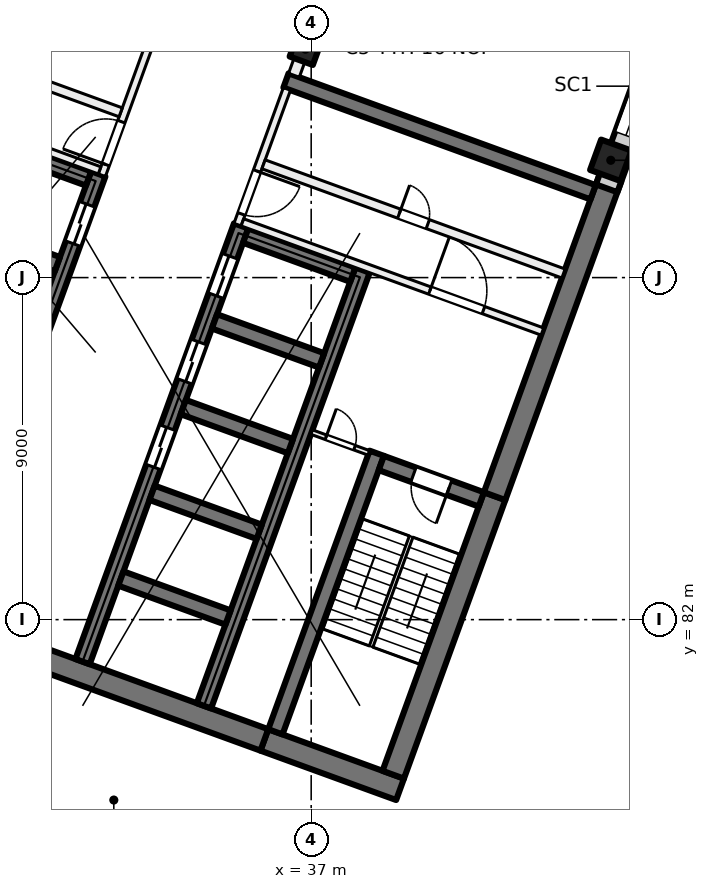
"""IFC4 building model, lengths in metres.
Left out: names, types, materials, properties, quantities, classifications, styles, units other than length and angle.
Written with IfcOpenShell. Run it as: python <this file> out.ifc"""

import sys

from ifc_helpers import new_model, si_unit, direction, frame, frame_2d, origin, origin_2d, place, context, subcontext, project, spatial, rectangle, extrude, element, fill, save


model = new_model("IFC4")
c1 = context("Model", 3, precision=1e-05, world=origin(), true_north=direction((0.0, 1.0)))
c2 = subcontext(c1, "Body", "Model", "MODEL_VIEW")
j1 = project(units=[si_unit("LENGTHUNIT", "METRE"), si_unit("PLANEANGLEUNIT", "RADIAN")], contexts=[c1])
p1 = place(None, origin())
s1 = spatial("IfcSite", under=j1, at=p1, CompositionType="ELEMENT")
p2 = place(p1, origin())
s2 = spatial("IfcBuilding", under=s1, at=p2, CompositionType="ELEMENT")
p3 = place(p2, frame((0.0, 0.0, 93.0)))
s3 = spatial("IfcBuildingStorey", under=s2, at=p3, CompositionType="ELEMENT", Elevation=93.0)
p4 = place(p3, frame((36.849, 97.011, 0.0), z_axis=(0.0, 0.0, 1.0), x_axis=(-0.342020143326, -0.939692620786, 0.0)))
e1 = element("IfcColumn", 1, at=p4, inside=s3, PredefinedType="COLUMN", context=c2, shape_type="SweptSolid", body=[
    extrude(rectangle(XDim=0.65, YDim=0.65, at=origin_2d()), origin(), (0.0, 0.0, 1.0), 4.0),
])
p5 = place(p3, frame((44.884, 94.087, 0.0), z_axis=(0.0, 0.0, 1.0), x_axis=(-0.342020143326, -0.939692620786, 0.0)))
e2 = element("IfcColumn", 2, at=p5, inside=s3, PredefinedType="COLUMN", context=c2, shape_type="SweptSolid", body=[
    extrude(rectangle(XDim=0.85, YDim=0.85, at=origin_2d()), origin(), (0.0, 0.0, 1.0), 4.0),
])
p6 = place(p3, frame((39.338, 77.535, 0.0), z_axis=(0.0, 0.0, 1.0), x_axis=(-0.939701471648, 0.341995824804, 0.0)))
e3 = element("IfcWall", 3, at=p6, inside=s3, PredefinedType="SHEAR", context=c2, shape_type="SweptSolid", body=[
    extrude(rectangle(XDim=3.8, YDim=0.6, at=frame_2d((1.9, 0.0))), origin(), (0.0, 0.0, 1.0), 4.0),
])
p7 = place(p3, frame((35.767, 78.835, 0.0), z_axis=(0.0, 0.0, 1.0), x_axis=(-0.939692894512, 0.342019391267, 0.0)))
e4 = element("IfcWall", 4, at=p7, inside=s3, PredefinedType="SHEAR", context=c2, shape_type="SweptSolid", body=[
    extrude(rectangle(XDim=14.4, YDim=0.6, at=frame_2d((7.2, 0.0))), origin(), (0.0, 0.0, 1.0), 4.0),
])
p8 = place(p3, frame((39.159, 77.92, 0.0), z_axis=(0.0, 0.0, 1.0), x_axis=(0.342016982193, 0.939693771338, 0.0)))
e5 = element("IfcWall", 5, at=p8, inside=s3, PredefinedType="SHEAR", context=c2, shape_type="SweptSolid", body=[
    extrude(rectangle(XDim=7.8, YDim=0.6, at=frame_2d((3.9, 0.0))), origin(), (0.0, 0.0, 1.0), 4.0),
])
p9 = place(p3, frame((41.827, 85.249, 0.0), z_axis=(0.0, 0.0, 1.0), x_axis=(0.342017595281, 0.939693548195, 0.0)))
e6 = element("IfcWall", 6, at=p9, inside=s3, PredefinedType="SHEAR", context=c2, shape_type="SweptSolid", body=[
    extrude(rectangle(XDim=8.925, YDim=0.6, at=frame_2d((4.462, 0.0))), origin(), (0.0, 0.0, 1.0), 4.0),
])
p10 = place(p3, frame((36.058, 79.048, 0.0), z_axis=(0.0, 0.0, 1.0), x_axis=(0.342016982193, 0.939693771338, 0.0)))
e7 = element("IfcWall", 7, at=p10, inside=s3, PredefinedType="SHEAR", context=c2, shape_type="SweptSolid", body=[
    extrude(rectangle(XDim=7.8, YDim=0.4, at=frame_2d((3.9, 0.0))), origin(), (0.0, 0.0, 1.0), 4.0),
])
p11 = place(p3, frame((41.476, 85.164, 0.0), z_axis=(0.0, 0.0, 1.0), x_axis=(-0.939678810556, 0.342058084236, 0.0)))
e8 = element("IfcWall", 8, at=p11, inside=s3, PredefinedType="SHEAR", context=c2, shape_type="SweptSolid", body=[
    extrude(rectangle(XDim=2.8, YDim=0.4, at=frame_2d((1.4, 0.0))), origin(), (0.0, 0.0, 1.0), 4.0),
])
p12 = place(p11, frame((0.9, 0.0, 0.0)))
e9 = element("IfcOpeningElement", 9, at=p12, cuts=e8, PredefinedType="OPENING", context=c2, shape_type="SweptSolid", body=[
    extrude(rectangle(XDim=1.0, YDim=2.1, at=frame_2d((0.5, 1.05))), frame((0.0, 0.21, 0.0), z_axis=(0.0, -1.0, 0.0), x_axis=(1.0, 0.0, 0.0)), (0.0, 0.0, 1.0), 0.42),
])
p13 = place(p3, frame((30.984, 80.895, 0.0), z_axis=(0.0, 0.0, 1.0), x_axis=(0.342021021735, 0.939692301071, 0.0)))
e10 = element("IfcWall", 10, at=p13, inside=s3, PredefinedType="SHEAR", context=c2, shape_type="SweptSolid", body=[
    extrude(rectangle(XDim=12.2, YDim=0.4, at=frame_2d((6.1, 0.0))), origin(), (0.0, 0.0, 1.0), 4.0),
])
p14 = place(p13, frame((5.45, 0.0, 0.0)))
e11 = element("IfcOpeningElement", 11, at=p14, cuts=e10, PredefinedType="OPENING", context=c2, shape_type="SweptSolid", body=[
    extrude(rectangle(XDim=1.1, YDim=2.1, at=frame_2d((0.55, 1.05))), frame((0.0, 0.21, 0.0), z_axis=(0.0, -1.0, 0.0), x_axis=(1.0, 0.0, 0.0)), (0.0, 0.0, 1.0), 0.42),
])
p15 = place(p13, frame((7.85, 0.0, 0.0)))
e12 = element("IfcOpeningElement", 12, at=p15, cuts=e10, PredefinedType="OPENING", context=c2, shape_type="SweptSolid", body=[
    extrude(rectangle(XDim=1.1, YDim=2.1, at=frame_2d((0.55, 1.05))), frame((0.0, 0.21, 0.0), z_axis=(0.0, -1.0, 0.0), x_axis=(1.0, 0.0, 0.0)), (0.0, 0.0, 1.0), 0.42),
])
p16 = place(p13, frame((10.25, 0.0, 0.0)))
e13 = element("IfcOpeningElement", 13, at=p16, cuts=e10, PredefinedType="OPENING", context=c2, shape_type="SweptSolid", body=[
    extrude(rectangle(XDim=1.1, YDim=2.1, at=frame_2d((0.55, 1.05))), frame((0.0, 0.21, 0.0), z_axis=(0.0, -1.0, 0.0), x_axis=(1.0, 0.0, 0.0)), (0.0, 0.0, 1.0), 0.42),
])
p17 = place(p3, frame((34.178, 79.732, 0.0), z_axis=(0.0, 0.0, 1.0), x_axis=(0.342014590177, 0.939694641948, 0.0)))
e14 = element("IfcWall", 14, at=p17, inside=s3, PredefinedType="SHEAR", context=c2, shape_type="SweptSolid", body=[
    extrude(rectangle(XDim=12.2, YDim=0.4, at=frame_2d((6.1, 0.0))), origin(), (0.0, 0.0, 1.0), 4.0),
])
for number, where, z_axis, x_axis in (
    (15, (34.812, 82.056, 0.0), (0.0, 0.0, 1.0), (-0.94, 0.342, 0.0)),
    (16, (35.632, 84.311, 0.0), (0.0, 0.0, 1.0), (-0.94, 0.342, 0.0)),
    (17, (36.453, 86.566, 0.0), (0.0, 0.0, 1.0), (-0.94, 0.342, 0.0)),
    (18, (37.274, 88.822, 0.0), (0.0, 0.0, 1.0), (-0.94, 0.342, 0.0)),
):
    element("IfcWall", number, at=place(p3, frame(where, z_axis=z_axis, x_axis=x_axis)), inside=s3, PredefinedType="SHEAR", context=c2, shape_type="SweptSolid", body=[
        extrude(rectangle(XDim=3.0, YDim=0.4, at=frame_2d((1.5, 0.0))), origin(), (0.0, 0.0, 1.0), 4.0),
    ])
p18 = place(p3, frame((38.095, 91.077, 0.0), z_axis=(0.0, 0.0, 1.0), x_axis=(-0.939676934218, 0.342063238742, 0.0)))
e19 = element("IfcWall", 19, at=p18, inside=s3, PredefinedType="SHEAR", context=c2, shape_type="SweptSolid", body=[
    extrude(rectangle(XDim=3.0, YDim=0.4, at=frame_2d((1.5, 0.0))), origin(), (0.0, 0.0, 1.0), 4.0),
])
p19 = place(p3, frame((27.225, 82.263, 0.0), z_axis=(0.0, 0.0, 1.0), x_axis=(0.342014590177, 0.939694641948, 0.0)))
e20 = element("IfcWall", 20, at=p19, inside=s3, PredefinedType="SHEAR", context=c2, shape_type="SweptSolid", body=[
    extrude(rectangle(XDim=12.2, YDim=0.4, at=frame_2d((6.1, 0.0))), origin(), (0.0, 0.0, 1.0), 4.0),
])
p20 = place(p19, frame((10.25, 0.0, 0.0)))
e21 = element("IfcOpeningElement", 21, at=p20, cuts=e20, PredefinedType="OPENING", context=c2, shape_type="SweptSolid", body=[
    extrude(rectangle(XDim=1.1, YDim=2.1, at=frame_2d((0.55, 1.05))), frame((0.0, 0.21, 0.0), z_axis=(0.0, -1.0, 0.0), x_axis=(1.0, 0.0, 0.0)), (0.0, 0.0, 1.0), 0.42),
])
p21 = place(p19, frame((0.7, 0.0, 0.0)))
e22 = element("IfcOpeningElement", 22, at=p21, cuts=e20, PredefinedType="OPENING", context=c2, shape_type="SweptSolid", body=[
    extrude(rectangle(XDim=0.8, YDim=2.1, at=frame_2d((0.4, 1.05))), frame((0.0, 0.21, 0.0), z_axis=(0.0, -1.0, 0.0), x_axis=(1.0, 0.0, 0.0)), (0.0, 0.0, 1.0), 0.42),
])
for number, where, z_axis, x_axis in (
    (23, (30.32, 91.353, 0.0), (0.0, 0.0, 1.0), (-0.94, 0.342, 0.0)),
    (24, (31.141, 93.608, 0.0), (0.0, 0.0, 1.0), (-0.94, 0.342, 0.0)),
):
    element("IfcWall", number, at=place(p3, frame(where, z_axis=z_axis, x_axis=x_axis)), inside=s3, PredefinedType="SHEAR", context=c2, shape_type="SweptSolid", body=[
        extrude(rectangle(XDim=3.0, YDim=0.4, at=frame_2d((1.5, 0.0))), origin(), (0.0, 0.0, 1.0), 4.0),
    ])
p22 = place(p3, frame((44.418, 93.245, 0.0), z_axis=(0.0, 0.0, 1.0), x_axis=(-0.93969060187, 0.342025690201, 0.0)))
e25 = element("IfcWall", 25, at=p22, inside=s3, PredefinedType="SHEAR", context=c2, shape_type="SweptSolid", body=[
    extrude(rectangle(XDim=8.6, YDim=0.4, at=frame_2d((4.3, 0.0))), origin(), (0.0, 0.0, 1.0), 4.0),
])
p23 = place(p3, frame((52.212, 113.783, 0.0), z_axis=(0.0, 0.0, 1.0), x_axis=(-0.34202521188, -0.939690775968, 0.0)))
e26 = element("IfcWall", 26, at=p23, inside=s3, PredefinedType="SOLIDWALL", context=c2, shape_type="SweptSolid", body=[
    extrude(rectangle(XDim=21.745, YDim=0.6, at=frame_2d((10.873, 0.0))), origin(), (0.0, 0.0, 1.0), 3.625),
])
p24 = place(p23, frame((3.765, 0.0, 0.9)))
e27 = element("IfcOpeningElement", 27, at=p24, cuts=e26, PredefinedType="OPENING", context=c2, shape_type="SweptSolid", body=[
    extrude(rectangle(XDim=3.0, YDim=2.4, at=frame_2d((1.5, 1.2))), frame((0.0, 0.31, 0.0), z_axis=(0.0, -1.0, 0.0), x_axis=(1.0, 0.0, 0.0)), (0.0, 0.0, 1.0), 0.62),
])
p25 = place(p23, frame((8.265, 0.0, 0.9)))
e28 = element("IfcOpeningElement", 28, at=p25, cuts=e26, PredefinedType="OPENING", context=c2, shape_type="SweptSolid", body=[
    extrude(rectangle(XDim=3.0, YDim=2.4, at=frame_2d((1.5, 1.2))), frame((0.0, 0.31, 0.0), z_axis=(0.0, -1.0, 0.0), x_axis=(1.0, 0.0, 0.0)), (0.0, 0.0, 1.0), 0.62),
])
p26 = place(p23, frame((12.765, 0.0, 0.9)))
e29 = element("IfcOpeningElement", 29, at=p26, cuts=e26, PredefinedType="OPENING", context=c2, shape_type="SweptSolid", body=[
    extrude(rectangle(XDim=3.0, YDim=2.4, at=frame_2d((1.5, 1.2))), frame((0.0, 0.31, 0.0), z_axis=(0.0, -1.0, 0.0), x_axis=(1.0, 0.0, 0.0)), (0.0, 0.0, 1.0), 0.62),
])
p27 = place(p23, frame((17.265, 0.0, 0.9)))
e30 = element("IfcOpeningElement", 30, at=p27, cuts=e26, PredefinedType="OPENING", context=c2, shape_type="SweptSolid", body=[
    extrude(rectangle(XDim=3.0, YDim=2.4, at=frame_2d((1.5, 1.2))), frame((0.0, 0.31, 0.0), z_axis=(0.0, -1.0, 0.0), x_axis=(1.0, 0.0, 0.0)), (0.0, 0.0, 1.0), 0.62),
])
p28 = place(p3, frame((31.491, 93.693, 0.0), z_axis=(0.0, 0.0, 1.0), x_axis=(0.341995824804, 0.939701471648, 0.0)))
e31 = element("IfcWall", 31, at=p28, inside=s3, PredefinedType="PARTITIONING", context=c2, shape_type="SweptSolid", body=[
    extrude(rectangle(XDim=3.8, YDim=0.2, at=frame_2d((1.9, 0.0))), origin(), (0.0, 0.0, 1.0), 3.625),
])
p29 = place(p28, frame((0.3, 0.0, 0.0)))
e32 = element("IfcOpeningElement", 32, at=p29, cuts=e31, PredefinedType="OPENING", context=c2, shape_type="SweptSolid", body=[
    extrude(rectangle(XDim=1.2, YDim=2.1, at=frame_2d((0.6, 1.05))), frame((0.0, 0.11, 0.0), z_axis=(0.0, -1.0, 0.0), x_axis=(1.0, 0.0, 0.0)), (0.0, 0.0, 1.0), 0.22),
])
p30 = place(p3, frame((23.538, 96.694, 0.0), z_axis=(0.0, 0.0, 1.0), x_axis=(0.939691552312, -0.342023078919, 0.0)))
e33 = element("IfcWall", 33, at=p30, inside=s3, PredefinedType="PARTITIONING", context=c2, shape_type="SweptSolid", body=[
    extrude(rectangle(XDim=8.4, YDim=0.2, at=frame_2d((4.2, 0.0))), origin(), (0.0, 0.0, 1.0), 3.625),
])
p31 = place(p30, frame((1.65, 0.0, 0.0)))
e34 = element("IfcOpeningElement", 34, at=p31, cuts=e33, PredefinedType="OPENING", context=c2, shape_type="SweptSolid", body=[
    extrude(rectangle(XDim=1.5, YDim=2.1, at=frame_2d((0.75, 1.05))), frame((0.0, 0.11, 0.0), z_axis=(0.0, -1.0, 0.0), x_axis=(1.0, 0.0, 0.0)), (0.0, 0.0, 1.0), 0.22),
])
p32 = place(p3, frame((24.094, 98.221, 0.0), z_axis=(0.0, 0.0, 1.0), x_axis=(0.939691552312, -0.342023078919, 0.0)))
e35 = element("IfcWall", 35, at=p32, inside=s3, PredefinedType="PARTITIONING", context=c2, shape_type="SweptSolid", body=[
    extrude(rectangle(XDim=8.4, YDim=0.25, at=frame_2d((4.2, 0.0))), origin(), (0.0, 0.0, 1.0), 3.625),
])
p33 = place(p32, frame((3.8, 0.0, 0.0)))
e36 = element("IfcOpeningElement", 36, at=p33, cuts=e35, PredefinedType="OPENING", context=c2, shape_type="SweptSolid", body=[
    extrude(rectangle(XDim=0.8, YDim=2.1, at=frame_2d((0.4, 1.05))), frame((0.0, 0.135, 0.0), z_axis=(0.0, -1.0, 0.0), x_axis=(1.0, 0.0, 0.0)), (0.0, 0.0, 1.0), 0.27),
])
p34 = place(p3, frame((36.362, 95.964, 0.0), z_axis=(0.0, 0.0, 1.0), x_axis=(-0.341995824804, -0.939701471648, 0.0)))
e37 = element("IfcWall", 37, at=p34, inside=s3, PredefinedType="PARTITIONING", context=c2, shape_type="SweptSolid", body=[
    extrude(rectangle(XDim=3.8, YDim=0.2, at=frame_2d((1.9, 0.0))), origin(), (0.0, 0.0, 1.0), 3.625),
])
p35 = place(p34, frame((2.3, 0.0, 0.0)))
e38 = element("IfcOpeningElement", 38, at=p35, cuts=e37, PredefinedType="OPENING", context=c2, shape_type="SweptSolid", body=[
    extrude(rectangle(XDim=1.2, YDim=2.1, at=frame_2d((0.6, 1.05))), frame((0.0, 0.11, 0.0), z_axis=(0.0, -1.0, 0.0), x_axis=(1.0, 0.0, 0.0)), (0.0, 0.0, 1.0), 0.22),
])
p36 = place(p3, frame((35.19, 92.453, 0.0), z_axis=(0.0, 0.0, 1.0), x_axis=(0.939691552312, -0.342023078919, 0.0)))
e39 = element("IfcWall", 39, at=p36, inside=s3, PredefinedType="PARTITIONING", context=c2, shape_type="SweptSolid", body=[
    extrude(rectangle(XDim=8.4, YDim=0.2, at=frame_2d((4.2, 0.0))), origin(), (0.0, 0.0, 1.0), 3.625),
])
p37 = place(p36, frame((5.25, 0.0, 0.0)))
e40 = element("IfcOpeningElement", 40, at=p37, cuts=e39, PredefinedType="OPENING", context=c2, shape_type="SweptSolid", body=[
    extrude(rectangle(XDim=1.5, YDim=2.1, at=frame_2d((0.75, 1.05))), frame((0.0, 0.11, 0.0), z_axis=(0.0, -1.0, 0.0), x_axis=(1.0, 0.0, 0.0)), (0.0, 0.0, 1.0), 0.22),
])
p38 = place(p3, frame((35.746, 93.98, 0.0), z_axis=(0.0, 0.0, 1.0), x_axis=(0.939691552312, -0.342023078919, 0.0)))
e41 = element("IfcWall", 41, at=p38, inside=s3, PredefinedType="PARTITIONING", context=c2, shape_type="SweptSolid", body=[
    extrude(rectangle(XDim=8.4, YDim=0.25, at=frame_2d((4.2, 0.0))), origin(), (0.0, 0.0, 1.0), 3.625),
])
p39 = place(p38, frame((3.8, 0.0, 0.0)))
e42 = element("IfcOpeningElement", 42, at=p39, cuts=e41, PredefinedType="OPENING", context=c2, shape_type="SweptSolid", body=[
    extrude(rectangle(XDim=0.8, YDim=2.1, at=frame_2d((0.4, 1.05))), frame((0.0, 0.135, 0.0), z_axis=(0.0, -1.0, 0.0), x_axis=(1.0, 0.0, 0.0)), (0.0, 0.0, 1.0), 0.27),
])
p40 = place(p3, frame((37.013, 86.935, 0.0), z_axis=(0.0, 0.0, 1.0), x_axis=(0.939659694648, -0.342110593602, 0.0)))
e43 = element("IfcWall", 43, at=p40, inside=s3, PredefinedType="PARTITIONING", context=c2, shape_type="SweptSolid", body=[
    extrude(rectangle(XDim=1.6, YDim=0.125, at=frame_2d((0.8, 0.0))), origin(), (0.0, 0.0, 1.0), 3.625),
])
p41 = place(p40, frame((0.4, 0.0, 0.0)))
e44 = element("IfcOpeningElement", 44, at=p41, cuts=e43, PredefinedType="OPENING", context=c2, shape_type="SweptSolid", body=[
    extrude(rectangle(XDim=0.8, YDim=2.1, at=frame_2d((0.4, 1.05))), frame((0.0, 0.073, 0.0), z_axis=(0.0, -1.0, 0.0), x_axis=(1.0, 0.0, 0.0)), (0.0, 0.0, 1.0), 0.145),
])
p42 = place(p3, frame((47.314, 125.909, 0.0), z_axis=(0.0, 0.0, 1.0), x_axis=(-0.342010770371, -0.939696032209, 0.0)))
e45 = element("IfcWall", 45, at=p42, inside=s3, PredefinedType="PARTITIONING", context=c2, shape_type="SweptSolid", body=[
    extrude(rectangle(XDim=31.485, YDim=0.3, at=frame_2d((15.742, 0.0))), origin(), (0.0, 0.0, 1.0), 3.625),
])
p43 = place(p42, frame((26.11, 0.0, 0.0)))
e46 = element("IfcOpeningElement", 46, at=p43, cuts=e45, PredefinedType="OPENING", context=c2, shape_type="SweptSolid", body=[
    extrude(rectangle(XDim=1.0, YDim=2.1, at=frame_2d((0.5, 1.05))), frame((0.0, 0.16, 0.0), z_axis=(0.0, -1.0, 0.0), x_axis=(1.0, 0.0, 0.0)), (0.0, 0.0, 1.0), 0.32),
])
p44 = place(p42, frame((15.485, 0.0, 0.0)))
e47 = element("IfcOpeningElement", 47, at=p44, cuts=e45, PredefinedType="OPENING", context=c2, shape_type="SweptSolid", body=[
    extrude(rectangle(XDim=1.0, YDim=2.1, at=frame_2d((0.5, 1.05))), frame((0.0, 0.16, 0.0), z_axis=(0.0, -1.0, 0.0), x_axis=(1.0, 0.0, 0.0)), (0.0, 0.0, 1.0), 0.32),
])
p45 = place(p42, frame((9.985, 0.0, 0.0)))
e48 = element("IfcOpeningElement", 48, at=p45, cuts=e45, PredefinedType="OPENING", context=c2, shape_type="SweptSolid", body=[
    extrude(rectangle(XDim=1.0, YDim=2.1, at=frame_2d((0.5, 1.05))), frame((0.0, 0.16, 0.0), z_axis=(0.0, -1.0, 0.0), x_axis=(1.0, 0.0, 0.0)), (0.0, 0.0, 1.0), 0.32),
])
p46 = place(p42, frame((5.484, 0.0, 0.0)))
e49 = element("IfcOpeningElement", 49, at=p46, cuts=e45, PredefinedType="OPENING", context=c2, shape_type="SweptSolid", body=[
    extrude(rectangle(XDim=1.0, YDim=2.1, at=frame_2d((0.5, 1.05))), frame((0.0, 0.16, 0.0), z_axis=(0.0, -1.0, 0.0), x_axis=(1.0, 0.0, 0.0)), (0.0, 0.0, 1.0), 0.32),
])
p47 = place(p27, origin())
e50 = element("IfcWindow", 50, at=p47, inside=s3, PartitioningType="SINGLE_PANEL", PredefinedType="WINDOW", context=c2, shape_type="SweptSolid", body=[
    extrude(rectangle(XDim=3.0, YDim=2.4, at=frame_2d((1.5, 1.2))), frame((0.0, 0.03, 0.0), z_axis=(0.0, -1.0, 0.0), x_axis=(1.0, 0.0, 0.0)), (0.0, 0.0, 1.0), 0.06),
])
fill(e30, e50)
p48 = place(p20, origin())
e51 = element("IfcDoor", 51, at=p48, inside=s3, OperationType="DOUBLE_DOOR_SLIDING", PredefinedType="DOOR", context=c2, shape_type="SweptSolid", body=[
    extrude(rectangle(XDim=1.1, YDim=2.1, at=frame_2d((0.55, 1.05))), frame((0.0, 0.025, 0.0), z_axis=(0.0, -1.0, 0.0), x_axis=(1.0, 0.0, 0.0)), (0.0, 0.0, 1.0), 0.05),
])
fill(e21, e51)
p49 = place(p14, origin())
e52 = element("IfcDoor", 52, at=p49, inside=s3, OperationType="DOUBLE_DOOR_SLIDING", PredefinedType="DOOR", context=c2, shape_type="SweptSolid", body=[
    extrude(rectangle(XDim=1.1, YDim=2.1, at=frame_2d((0.55, 1.05))), frame((0.0, 0.025, 0.0), z_axis=(0.0, -1.0, 0.0), x_axis=(1.0, 0.0, 0.0)), (0.0, 0.0, 1.0), 0.05),
])
fill(e11, e52)
p50 = place(p15, origin())
e53 = element("IfcDoor", 53, at=p50, inside=s3, OperationType="DOUBLE_DOOR_SLIDING", PredefinedType="DOOR", context=c2, shape_type="SweptSolid", body=[
    extrude(rectangle(XDim=1.1, YDim=2.1, at=frame_2d((0.55, 1.05))), frame((0.0, 0.025, 0.0), z_axis=(0.0, -1.0, 0.0), x_axis=(1.0, 0.0, 0.0)), (0.0, 0.0, 1.0), 0.05),
])
fill(e12, e53)
p51 = place(p16, origin())
e54 = element("IfcDoor", 54, at=p51, inside=s3, OperationType="DOUBLE_DOOR_SLIDING", PredefinedType="DOOR", context=c2, shape_type="SweptSolid", body=[
    extrude(rectangle(XDim=1.1, YDim=2.1, at=frame_2d((0.55, 1.05))), frame((0.0, 0.025, 0.0), z_axis=(0.0, -1.0, 0.0), x_axis=(1.0, 0.0, 0.0)), (0.0, 0.0, 1.0), 0.05),
])
fill(e13, e54)
p52 = place(p29, origin())
e55 = element("IfcDoor", 55, at=p52, inside=s3, OperationType="DOUBLE_DOOR_SINGLE_SWING", PredefinedType="DOOR", context=c2, shape_type="SweptSolid", body=[
    extrude(rectangle(XDim=1.2, YDim=2.1, at=frame_2d((0.6, 1.05))), frame((0.0, 0.025, 0.0), z_axis=(0.0, -1.0, 0.0), x_axis=(1.0, 0.0, 0.0)), (0.0, 0.0, 1.0), 0.05),
])
fill(e32, e55)
p53 = place(p35, origin())
e56 = element("IfcDoor", 56, at=p53, inside=s3, OperationType="DOUBLE_DOOR_SINGLE_SWING", PredefinedType="DOOR", context=c2, shape_type="SweptSolid", body=[
    extrude(rectangle(XDim=1.2, YDim=2.1, at=frame_2d((0.6, 1.05))), frame((0.0, 0.025, 0.0), z_axis=(0.0, -1.0, 0.0), x_axis=(1.0, 0.0, 0.0)), (0.0, 0.0, 1.0), 0.05),
])
fill(e38, e56)
p54 = place(p37, origin())
e57 = element("IfcDoor", 57, at=p54, inside=s3, OperationType="DOUBLE_DOOR_SINGLE_SWING", PredefinedType="DOOR", context=c2, shape_type="SweptSolid", body=[
    extrude(rectangle(XDim=1.5, YDim=2.1, at=frame_2d((0.75, 1.05))), frame((0.0, 0.025, 0.0), z_axis=(0.0, -1.0, 0.0), x_axis=(1.0, 0.0, 0.0)), (0.0, 0.0, 1.0), 0.05),
])
fill(e40, e57)
p55 = place(p12, origin())
e58 = element("IfcDoor", 58, at=p55, inside=s3, OperationType="SINGLE_SWING_RIGHT", PredefinedType="DOOR", context=c2, shape_type="SweptSolid", body=[
    extrude(rectangle(XDim=1.0, YDim=2.1, at=frame_2d((0.5, 1.05))), frame((0.0, 0.025, 0.0), z_axis=(0.0, -1.0, 0.0), x_axis=(1.0, 0.0, 0.0)), (0.0, 0.0, 1.0), 0.05),
])
fill(e9, e58)
p56 = place(p41, origin())
e59 = element("IfcDoor", 59, at=p56, inside=s3, OperationType="SINGLE_SWING_LEFT", PredefinedType="DOOR", context=c2, shape_type="SweptSolid", body=[
    extrude(rectangle(XDim=0.8, YDim=2.1, at=frame_2d((0.4, 1.05))), frame((0.0, 0.025, 0.0), z_axis=(0.0, -1.0, 0.0), x_axis=(1.0, 0.0, 0.0)), (0.0, 0.0, 1.0), 0.05),
])
fill(e44, e59)
p57 = place(p39, origin())
e60 = element("IfcDoor", 60, at=p57, inside=s3, OperationType="SINGLE_SWING_RIGHT", PredefinedType="DOOR", context=c2, shape_type="SweptSolid", body=[
    extrude(rectangle(XDim=0.8, YDim=2.1, at=frame_2d((0.4, 1.05))), frame((0.0, 0.025, 0.0), z_axis=(0.0, -1.0, 0.0), x_axis=(1.0, 0.0, 0.0)), (0.0, 0.0, 1.0), 0.05),
])
fill(e42, e60)
save(model, sys.argv[1])
